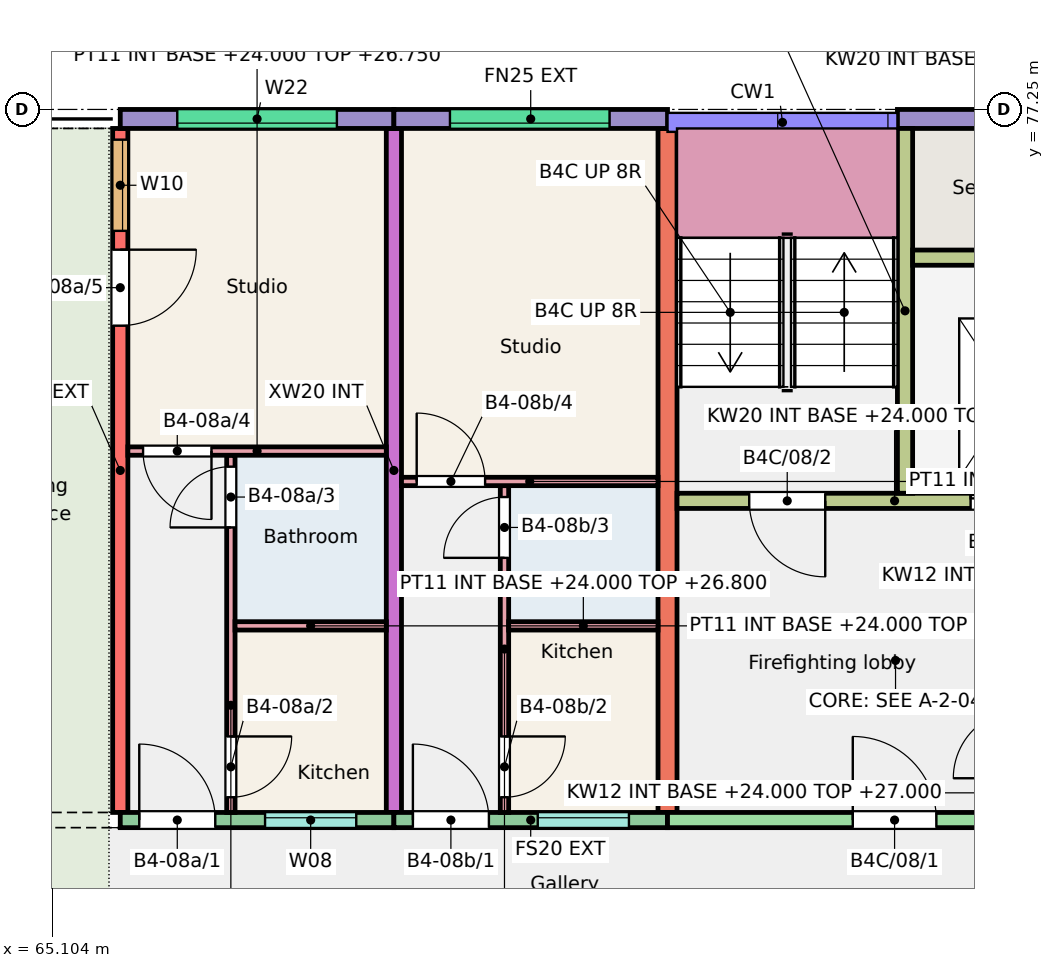
"""IFC4 building model, lengths in metres.
Left out: names, types, materials, properties, quantities, classifications, styles, units other than length and angle.
Written with IfcOpenShell. Run it as: python <this file> out.ifc"""

import sys

from ifc_helpers import new_model, si_unit, direction, frame, frame_2d, origin, place, context, subcontext, project, spatial, rectangle, extrude, element, fill, save


model = new_model("IFC4")
c1 = context("Model", 3, precision=1e-05, world=origin(), true_north=direction((0.0, 1.0)))
c2 = subcontext(c1, "Body", "Model", "MODEL_VIEW")
j1 = project(units=[si_unit("LENGTHUNIT", "METRE"), si_unit("PLANEANGLEUNIT", "RADIAN")], contexts=[c1])
p1 = place(None, origin())
s1 = spatial("IfcSite", under=j1, at=p1, CompositionType="ELEMENT")
p2 = place(p1, origin())
s2 = spatial("IfcBuilding", under=s1, at=p2, CompositionType="ELEMENT")
p3 = place(p2, frame((0.0, 0.0, 24.0)))
s3 = spatial("IfcBuildingStorey", under=s2, at=p3, CompositionType="ELEMENT", Elevation=24.0)
p4 = place(p3, frame((66.0, 68.0, 0.0), z_axis=(0.0, 0.0, 1.0), x_axis=(0.0, 1.0, 0.0)))
e1 = element("IfcWall", 1, at=p4, inside=s3, PredefinedType="SHEAR", context=c2, shape_type="SweptSolid", body=[
    extrude(rectangle(XDim=9.0, YDim=0.2, at=frame_2d((4.5, 0.0))), origin(), (0.0, 0.0, 1.0), 3.0),
])
p5 = place(p4, frame((7.653, 0.0, 0.9)))
e2 = element("IfcOpeningElement", 2, at=p5, cuts=e1, PredefinedType="OPENING", context=c2, shape_type="SweptSolid", body=[
    extrude(rectangle(XDim=1.2, YDim=1.5, at=frame_2d((0.6, 0.75))), frame((0.0, 0.11, 0.0), z_axis=(0.0, -1.0, 0.0), x_axis=(1.0, 0.0, 0.0)), (0.0, 0.0, 1.0), 0.22),
])
p6 = place(p4, frame((6.405, 0.0, 0.0)))
e3 = element("IfcOpeningElement", 3, at=p6, cuts=e1, PredefinedType="OPENING", context=c2, shape_type="SweptSolid", body=[
    extrude(rectangle(XDim=1.0, YDim=2.1, at=frame_2d((0.5, 1.05))), frame((0.0, 0.11, 0.0), z_axis=(0.0, -1.0, 0.0), x_axis=(1.0, 0.0, 0.0)), (0.0, 0.0, 1.0), 0.22),
])
p7 = place(p3, frame((69.6, 68.0, 0.0), z_axis=(0.0, 0.0, 1.0), x_axis=(0.0, 1.0, 0.0)))
e4 = element("IfcWall", 4, at=p7, inside=s3, PredefinedType="SHEAR", context=c2, shape_type="SweptSolid", body=[
    extrude(rectangle(XDim=9.0, YDim=0.2, at=frame_2d((4.5, 0.0))), origin(), (0.0, 0.0, 1.0), 3.0),
])
p8 = place(p3, frame((73.2, 68.0, 0.0), z_axis=(0.0, 0.0, 1.0), x_axis=(0.0, 1.0, 0.0)))
e5 = element("IfcWall", 5, at=p8, inside=s3, PredefinedType="SHEAR", context=c2, shape_type="SweptSolid", body=[
    extrude(rectangle(XDim=9.0, YDim=0.25, at=frame_2d((4.5, 0.0))), origin(), (0.0, 0.0, 1.0), 3.0),
])
p9 = place(p3, frame((66.0, 77.125, 0.0), z_axis=(0.0, 0.0, 1.0), x_axis=(1.0, 0.0, 0.0)))
e6 = element("IfcWall", 6, at=p9, inside=s3, PredefinedType="SOLIDWALL", context=c2, shape_type="SweptSolid", body=[
    extrude(rectangle(XDim=3.6, YDim=0.25, at=frame_2d((1.8, 0.0))), origin(), (0.0, 0.0, 1.0), 3.0),
])
p10 = place(p9, frame((0.75, 0.0, 1.2)))
e7 = element("IfcOpeningElement", 7, at=p10, cuts=e6, PredefinedType="OPENING", context=c2, shape_type="SweptSolid", body=[
    extrude(rectangle(XDim=2.1, YDim=1.2, at=frame_2d((1.05, 0.6))), frame((0.0, 0.135, 0.0), z_axis=(0.0, -1.0, 0.0), x_axis=(1.0, 0.0, 0.0)), (0.0, 0.0, 1.0), 0.27),
])
p11 = place(p3, frame((66.0, 67.9, 0.0), z_axis=(0.0, 0.0, 1.0), x_axis=(1.0, 0.0, 0.0)))
e8 = element("IfcWall", 8, at=p11, inside=s3, PredefinedType="SOLIDWALL", context=c2, shape_type="SweptSolid", body=[
    extrude(rectangle(XDim=3.6, YDim=0.2, at=frame_2d((1.8, 0.0))), origin(), (0.0, 0.0, 1.0), 3.0),
])
p12 = place(p11, frame((1.905, 0.0, 1.1)))
e9 = element("IfcOpeningElement", 9, at=p12, cuts=e8, PredefinedType="OPENING", context=c2, shape_type="SweptSolid", body=[
    extrude(rectangle(XDim=1.2, YDim=1.3, at=frame_2d((0.6, 0.65))), frame((0.0, 0.11, 0.0), z_axis=(0.0, -1.0, 0.0), x_axis=(1.0, 0.0, 0.0)), (0.0, 0.0, 1.0), 0.22),
])
p13 = place(p11, frame((0.25, 0.0, 0.0)))
e10 = element("IfcOpeningElement", 10, at=p13, cuts=e8, PredefinedType="OPENING", context=c2, shape_type="SweptSolid", body=[
    extrude(rectangle(XDim=1.0, YDim=2.1, at=frame_2d((0.5, 1.05))), frame((0.0, 0.11, 0.0), z_axis=(0.0, -1.0, 0.0), x_axis=(1.0, 0.0, 0.0)), (0.0, 0.0, 1.0), 0.22),
])
p14 = place(p3, frame((69.6, 77.125, 0.0), z_axis=(0.0, 0.0, 1.0), x_axis=(1.0, 0.0, 0.0)))
e11 = element("IfcWall", 11, at=p14, inside=s3, PredefinedType="SOLIDWALL", context=c2, shape_type="SweptSolid", body=[
    extrude(rectangle(XDim=3.6, YDim=0.25, at=frame_2d((1.8, 0.0))), origin(), (0.0, 0.0, 1.0), 3.0),
])
p15 = place(p14, frame((0.738, 0.0, 1.2)))
e12 = element("IfcOpeningElement", 12, at=p15, cuts=e11, PredefinedType="OPENING", context=c2, shape_type="SweptSolid", body=[
    extrude(rectangle(XDim=2.1, YDim=1.2, at=frame_2d((1.05, 0.6))), frame((0.0, 0.135, 0.0), z_axis=(0.0, -1.0, 0.0), x_axis=(1.0, 0.0, 0.0)), (0.0, 0.0, 1.0), 0.27),
])
p16 = place(p3, frame((69.6, 67.9, 0.0), z_axis=(0.0, 0.0, 1.0), x_axis=(1.0, 0.0, 0.0)))
e13 = element("IfcWall", 13, at=p16, inside=s3, PredefinedType="SOLIDWALL", context=c2, shape_type="SweptSolid", body=[
    extrude(rectangle(XDim=3.6, YDim=0.2, at=frame_2d((1.8, 0.0))), origin(), (0.0, 0.0, 1.0), 3.0),
])
p17 = place(p16, frame((1.893, 0.0, 1.1)))
e14 = element("IfcOpeningElement", 14, at=p17, cuts=e13, PredefinedType="OPENING", context=c2, shape_type="SweptSolid", body=[
    extrude(rectangle(XDim=1.2, YDim=1.3, at=frame_2d((0.6, 0.65))), frame((0.0, 0.11, 0.0), z_axis=(0.0, -1.0, 0.0), x_axis=(1.0, 0.0, 0.0)), (0.0, 0.0, 1.0), 0.22),
])
p18 = place(p16, frame((0.25, 0.0, 0.0)))
e15 = element("IfcOpeningElement", 15, at=p18, cuts=e13, PredefinedType="OPENING", context=c2, shape_type="SweptSolid", body=[
    extrude(rectangle(XDim=1.0, YDim=2.1, at=frame_2d((0.5, 1.05))), frame((0.0, 0.11, 0.0), z_axis=(0.0, -1.0, 0.0), x_axis=(1.0, 0.0, 0.0)), (0.0, 0.0, 1.0), 0.22),
])
p19 = place(p3, frame((76.225, 77.125, 0.0), z_axis=(0.0, 0.0, 1.0), x_axis=(1.0, 0.0, 0.0)))
e16 = element("IfcWall", 16, at=p19, inside=s3, PredefinedType="SOLIDWALL", context=c2, shape_type="SweptSolid", body=[
    extrude(rectangle(XDim=2.975, YDim=0.25, at=frame_2d((1.487, 0.0))), origin(), (0.0, 0.0, 1.0), 3.0),
])
p20 = place(p3, frame((73.2, 67.9, 0.0), z_axis=(0.0, 0.0, 1.0), x_axis=(1.0, 0.0, 0.0)))
e17 = element("IfcWall", 17, at=p20, inside=s3, PredefinedType="SHEAR", context=c2, shape_type="SweptSolid", body=[
    extrude(rectangle(XDim=5.85, YDim=0.2, at=frame_2d((2.925, 0.0))), origin(), (0.0, 0.0, 1.0), 3.0),
])
p21 = place(p20, frame((2.438, 0.0, 0.0)))
e18 = element("IfcOpeningElement", 18, at=p21, cuts=e17, PredefinedType="OPENING", context=c2, shape_type="SweptSolid", body=[
    extrude(rectangle(XDim=1.1, YDim=2.1, at=frame_2d((0.55, 1.05))), frame((0.0, 0.11, 0.0), z_axis=(0.0, -1.0, 0.0), x_axis=(1.0, 0.0, 0.0)), (0.0, 0.0, 1.0), 0.22),
])
p22 = place(p3, frame((73.325, 72.1, 0.0), z_axis=(0.0, 0.0, 1.0), x_axis=(1.0, 0.0, 0.0)))
e19 = element("IfcWall", 19, at=p22, inside=s3, PredefinedType="SHEAR", context=c2, shape_type="SweptSolid", body=[
    extrude(rectangle(XDim=5.725, YDim=0.2, at=frame_2d((2.863, 0.0))), origin(), (0.0, 0.0, 1.0), 3.0),
])
p23 = place(p22, frame((0.95, 0.0, 0.0)))
e20 = element("IfcOpeningElement", 20, at=p23, cuts=e19, PredefinedType="OPENING", context=c2, shape_type="SweptSolid", body=[
    extrude(rectangle(XDim=1.0, YDim=2.1, at=frame_2d((0.5, 1.05))), frame((0.0, 0.11, 0.0), z_axis=(0.0, -1.0, 0.0), x_axis=(1.0, 0.0, 0.0)), (0.0, 0.0, 1.0), 0.22),
])
p24 = place(p22, frame((3.863, 0.0, 0.0)))
e21 = element("IfcOpeningElement", 21, at=p24, cuts=e19, PredefinedType="OPENING", context=c2, shape_type="SweptSolid", body=[
    extrude(rectangle(XDim=1.1, YDim=2.1, at=frame_2d((0.55, 1.05))), frame((0.0, 0.11, 0.0), z_axis=(0.0, -1.0, 0.0), x_axis=(1.0, 0.0, 0.0)), (0.0, 0.0, 1.0), 0.22),
])
p25 = place(p3, frame((76.325, 72.2, 0.0), z_axis=(0.0, 0.0, 1.0), x_axis=(0.0, 1.0, 0.0)))
e22 = element("IfcWall", 22, at=p25, inside=s3, PredefinedType="SHEAR", context=c2, shape_type="SweptSolid", body=[
    extrude(rectangle(XDim=4.8, YDim=0.2, at=frame_2d((2.4, 0.0))), origin(), (0.0, 0.0, 1.0), 3.0),
])
p26 = place(p3, frame((76.425, 75.3, 0.0), z_axis=(0.0, 0.0, 1.0), x_axis=(1.0, 0.0, 0.0)))
e23 = element("IfcWall", 23, at=p26, inside=s3, PredefinedType="SHEAR", context=c2, shape_type="SweptSolid", body=[
    extrude(rectangle(XDim=2.625, YDim=0.2, at=frame_2d((1.312, 0.0))), origin(), (0.0, 0.0, 1.0), 3.0),
])
p27 = place(p3, frame((67.455, 68.0, 0.0), z_axis=(0.0, 0.0, 1.0), x_axis=(0.0, 1.0, 0.0)))
e24 = element("IfcWall", 24, at=p27, inside=s3, PredefinedType="PARTITIONING", context=c2, shape_type="SweptSolid", body=[
    extrude(rectangle(XDim=4.7, YDim=0.11, at=frame_2d((2.35, 0.0))), origin(), (0.0, 0.0, 1.0), 2.75),
])
p28 = place(p27, frame((0.2, 0.0, 0.0)))
e25 = element("IfcOpeningElement", 25, at=p28, cuts=e24, PredefinedType="OPENING", context=c2, shape_type="SweptSolid", body=[
    extrude(rectangle(XDim=0.8, YDim=2.1, at=frame_2d((0.4, 1.05))), frame((0.0, 0.065, 0.0), z_axis=(0.0, -1.0, 0.0), x_axis=(1.0, 0.0, 0.0)), (0.0, 0.0, 1.0), 0.13),
])
p29 = place(p27, frame((3.75, 0.0, 0.0)))
e26 = element("IfcOpeningElement", 26, at=p29, cuts=e24, PredefinedType="OPENING", context=c2, shape_type="SweptSolid", body=[
    extrude(rectangle(XDim=0.8, YDim=2.1, at=frame_2d((0.4, 1.05))), frame((0.0, 0.065, 0.0), z_axis=(0.0, -1.0, 0.0), x_axis=(1.0, 0.0, 0.0)), (0.0, 0.0, 1.0), 0.13),
])
p30 = place(p3, frame((67.51, 70.455, 0.0), z_axis=(0.0, 0.0, 1.0), x_axis=(1.0, 0.0, 0.0)))
e27 = element("IfcWall", 27, at=p30, inside=s3, PredefinedType="PARTITIONING", context=c2, shape_type="SweptSolid", body=[
    extrude(rectangle(XDim=1.99, YDim=0.11, at=frame_2d((0.995, 0.0))), origin(), (0.0, 0.0, 1.0), 2.75),
])
p31 = place(p3, frame((66.1, 72.755, 0.0), z_axis=(0.0, 0.0, 1.0), x_axis=(1.0, 0.0, 0.0)))
e28 = element("IfcWall", 28, at=p31, inside=s3, PredefinedType="PARTITIONING", context=c2, shape_type="SweptSolid", body=[
    extrude(rectangle(XDim=3.4, YDim=0.11, at=frame_2d((1.7, 0.0))), origin(), (0.0, 0.0, 1.0), 2.75),
])
p32 = place(p31, frame((0.2, 0.0, 0.0)))
e29 = element("IfcOpeningElement", 29, at=p32, cuts=e28, PredefinedType="OPENING", context=c2, shape_type="SweptSolid", body=[
    extrude(rectangle(XDim=0.9, YDim=2.1, at=frame_2d((0.45, 1.05))), frame((0.0, 0.065, 0.0), z_axis=(0.0, -1.0, 0.0), x_axis=(1.0, 0.0, 0.0)), (0.0, 0.0, 1.0), 0.13),
])
p33 = place(p3, frame((71.055, 68.0, 0.0), z_axis=(0.0, 0.0, 1.0), x_axis=(0.0, 1.0, 0.0)))
e30 = element("IfcWall", 30, at=p33, inside=s3, PredefinedType="PARTITIONING", context=c2, shape_type="SweptSolid", body=[
    extrude(rectangle(XDim=4.3, YDim=0.11, at=frame_2d((2.15, 0.0))), origin(), (0.0, 0.0, 1.0), 2.8),
])
p34 = place(p33, frame((0.2, 0.0, 0.0)))
e31 = element("IfcOpeningElement", 31, at=p34, cuts=e30, PredefinedType="OPENING", context=c2, shape_type="SweptSolid", body=[
    extrude(rectangle(XDim=0.8, YDim=2.1, at=frame_2d((0.4, 1.05))), frame((0.0, 0.065, 0.0), z_axis=(0.0, -1.0, 0.0), x_axis=(1.0, 0.0, 0.0)), (0.0, 0.0, 1.0), 0.13),
])
p35 = place(p33, frame((3.35, 0.0, 0.0)))
e32 = element("IfcOpeningElement", 32, at=p35, cuts=e30, PredefinedType="OPENING", context=c2, shape_type="SweptSolid", body=[
    extrude(rectangle(XDim=0.8, YDim=2.1, at=frame_2d((0.4, 1.05))), frame((0.0, 0.065, 0.0), z_axis=(0.0, -1.0, 0.0), x_axis=(1.0, 0.0, 0.0)), (0.0, 0.0, 1.0), 0.13),
])
p36 = place(p3, frame((71.11, 70.455, 0.0), z_axis=(0.0, 0.0, 1.0), x_axis=(1.0, 0.0, 0.0)))
e33 = element("IfcWall", 33, at=p36, inside=s3, PredefinedType="PARTITIONING", context=c2, shape_type="SweptSolid", body=[
    extrude(rectangle(XDim=1.965, YDim=0.11, at=frame_2d((0.982, 0.0))), origin(), (0.0, 0.0, 1.0), 2.8),
])
p37 = place(p3, frame((69.7, 72.355, 0.0), z_axis=(0.0, 0.0, 1.0), x_axis=(1.0, 0.0, 0.0)))
e34 = element("IfcWall", 34, at=p37, inside=s3, PredefinedType="PARTITIONING", context=c2, shape_type="SweptSolid", body=[
    extrude(rectangle(XDim=3.375, YDim=0.11, at=frame_2d((1.688, 0.0))), origin(), (0.0, 0.0, 1.0), 2.8),
])
p38 = place(p37, frame((0.2, 0.0, 0.0)))
e35 = element("IfcOpeningElement", 35, at=p38, cuts=e34, PredefinedType="OPENING", context=c2, shape_type="SweptSolid", body=[
    extrude(rectangle(XDim=0.9, YDim=2.1, at=frame_2d((0.45, 1.05))), frame((0.0, 0.065, 0.0), z_axis=(0.0, -1.0, 0.0), x_axis=(1.0, 0.0, 0.0)), (0.0, 0.0, 1.0), 0.13),
])
p39 = place(p12, origin())
e36 = element("IfcWindow", 36, at=p39, inside=s3, PartitioningType="SINGLE_PANEL", PredefinedType="WINDOW", context=c2, shape_type="SweptSolid", body=[
    extrude(rectangle(XDim=1.2, YDim=1.3, at=frame_2d((0.6, 0.65))), frame((0.0, 0.06, 0.0), z_axis=(0.0, -1.0, 0.0), x_axis=(1.0, 0.0, 0.0)), (0.0, 0.0, 1.0), 0.06),
])
fill(e9, e36)
p40 = place(p10, origin())
e37 = element("IfcWindow", 37, at=p40, inside=s3, PartitioningType="SINGLE_PANEL", PredefinedType="WINDOW", context=c2, shape_type="SweptSolid", body=[
    extrude(rectangle(XDim=2.1, YDim=1.2, at=frame_2d((1.05, 0.6))), frame((0.0, -0.025, 0.0), z_axis=(0.0, -1.0, 0.0), x_axis=(1.0, 0.0, 0.0)), (0.0, 0.0, 1.0), 0.06),
])
fill(e7, e37)
p41 = place(p5, origin())
e38 = element("IfcWindow", 38, at=p41, inside=s3, PartitioningType="SINGLE_PANEL", PredefinedType="WINDOW", context=c2, shape_type="SweptSolid", body=[
    extrude(rectangle(XDim=1.2, YDim=1.5, at=frame_2d((0.6, 0.75))), frame((0.0, 0.0, 0.0), z_axis=(0.0, -1.0, 0.0), x_axis=(1.0, 0.0, 0.0)), (0.0, 0.0, 1.0), 0.06),
])
fill(e2, e38)
p42 = place(p17, origin())
e39 = element("IfcWindow", 39, at=p42, inside=s3, PartitioningType="SINGLE_PANEL", PredefinedType="WINDOW", context=c2, shape_type="SweptSolid", body=[
    extrude(rectangle(XDim=1.2, YDim=1.3, at=frame_2d((0.6, 0.65))), frame((0.0, 0.06, 0.0), z_axis=(0.0, -1.0, 0.0), x_axis=(1.0, 0.0, 0.0)), (0.0, 0.0, 1.0), 0.06),
])
fill(e14, e39)
p43 = place(p15, origin())
e40 = element("IfcWindow", 40, at=p43, inside=s3, PartitioningType="SINGLE_PANEL", PredefinedType="WINDOW", context=c2, shape_type="SweptSolid", body=[
    extrude(rectangle(XDim=2.1, YDim=1.2, at=frame_2d((1.05, 0.6))), frame((0.0, -0.025, 0.0), z_axis=(0.0, -1.0, 0.0), x_axis=(1.0, 0.0, 0.0)), (0.0, 0.0, 1.0), 0.06),
])
fill(e12, e40)
p44 = place(p13, origin())
e41 = element("IfcDoor", 41, at=p44, inside=s3, OperationType="SINGLE_SWING_LEFT", PredefinedType="DOOR", context=c2, shape_type="SweptSolid", body=[
    extrude(rectangle(XDim=1.0, YDim=2.1, at=frame_2d((0.5, 1.05))), frame((0.0, 0.025, 0.0), z_axis=(0.0, -1.0, 0.0), x_axis=(1.0, 0.0, 0.0)), (0.0, 0.0, 1.0), 0.05),
])
fill(e10, e41)
p45 = place(p28, origin())
e42 = element("IfcDoor", 42, at=p45, inside=s3, OperationType="SINGLE_SWING_RIGHT", PredefinedType="DOOR", context=c2, shape_type="SweptSolid", body=[
    extrude(rectangle(XDim=0.8, YDim=2.1, at=frame_2d((0.4, 1.05))), frame((0.0, 0.025, 0.0), z_axis=(0.0, -1.0, 0.0), x_axis=(1.0, 0.0, 0.0)), (0.0, 0.0, 1.0), 0.05),
])
fill(e25, e42)
p46 = place(p29, origin())
e43 = element("IfcDoor", 43, at=p46, inside=s3, OperationType="SINGLE_SWING_LEFT", PredefinedType="DOOR", context=c2, shape_type="SweptSolid", body=[
    extrude(rectangle(XDim=0.8, YDim=2.1, at=frame_2d((0.4, 1.05))), frame((0.0, 0.025, 0.0), z_axis=(0.0, -1.0, 0.0), x_axis=(1.0, 0.0, 0.0)), (0.0, 0.0, 1.0), 0.05),
])
fill(e26, e43)
p47 = place(p32, origin())
e44 = element("IfcDoor", 44, at=p47, inside=s3, OperationType="SINGLE_SWING_RIGHT", PredefinedType="DOOR", context=c2, shape_type="SweptSolid", body=[
    extrude(rectangle(XDim=0.9, YDim=2.1, at=frame_2d((0.45, 1.05))), frame((0.0, 0.025, 0.0), z_axis=(0.0, -1.0, 0.0), x_axis=(1.0, 0.0, 0.0)), (0.0, 0.0, 1.0), 0.05),
])
fill(e29, e44)
p48 = place(p6, origin())
e45 = element("IfcDoor", 45, at=p48, inside=s3, OperationType="SINGLE_SWING_RIGHT", PredefinedType="DOOR", context=c2, shape_type="SweptSolid", body=[
    extrude(rectangle(XDim=1.0, YDim=2.1, at=frame_2d((0.5, 1.05))), frame((0.0, 0.025, 0.0), z_axis=(0.0, -1.0, 0.0), x_axis=(1.0, 0.0, 0.0)), (0.0, 0.0, 1.0), 0.05),
])
fill(e3, e45)
p49 = place(p18, origin())
e46 = element("IfcDoor", 46, at=p49, inside=s3, OperationType="SINGLE_SWING_LEFT", PredefinedType="DOOR", context=c2, shape_type="SweptSolid", body=[
    extrude(rectangle(XDim=1.0, YDim=2.1, at=frame_2d((0.5, 1.05))), frame((0.0, 0.025, 0.0), z_axis=(0.0, -1.0, 0.0), x_axis=(1.0, 0.0, 0.0)), (0.0, 0.0, 1.0), 0.05),
])
fill(e15, e46)
p50 = place(p34, origin())
e47 = element("IfcDoor", 47, at=p50, inside=s3, OperationType="SINGLE_SWING_RIGHT", PredefinedType="DOOR", context=c2, shape_type="SweptSolid", body=[
    extrude(rectangle(XDim=0.8, YDim=2.1, at=frame_2d((0.4, 1.05))), frame((0.0, 0.025, 0.0), z_axis=(0.0, -1.0, 0.0), x_axis=(1.0, 0.0, 0.0)), (0.0, 0.0, 1.0), 0.05),
])
fill(e31, e47)
p51 = place(p35, origin())
e48 = element("IfcDoor", 48, at=p51, inside=s3, OperationType="SINGLE_SWING_LEFT", PredefinedType="DOOR", context=c2, shape_type="SweptSolid", body=[
    extrude(rectangle(XDim=0.8, YDim=2.1, at=frame_2d((0.4, 1.05))), frame((0.0, 0.025, 0.0), z_axis=(0.0, -1.0, 0.0), x_axis=(1.0, 0.0, 0.0)), (0.0, 0.0, 1.0), 0.05),
])
fill(e32, e48)
p52 = place(p38, origin())
e49 = element("IfcDoor", 49, at=p52, inside=s3, OperationType="SINGLE_SWING_LEFT", PredefinedType="DOOR", context=c2, shape_type="SweptSolid", body=[
    extrude(rectangle(XDim=0.9, YDim=2.1, at=frame_2d((0.45, 1.05))), frame((0.0, 0.025, 0.0), z_axis=(0.0, -1.0, 0.0), x_axis=(1.0, 0.0, 0.0)), (0.0, 0.0, 1.0), 0.05),
])
fill(e35, e49)
p53 = place(p21, origin())
e50 = element("IfcDoor", 50, at=p53, inside=s3, OperationType="SINGLE_SWING_LEFT", PredefinedType="DOOR", context=c2, shape_type="SweptSolid", body=[
    extrude(rectangle(XDim=1.1, YDim=2.1, at=frame_2d((0.55, 1.05))), frame((0.0, 0.025, 0.0), z_axis=(0.0, -1.0, 0.0), x_axis=(1.0, 0.0, 0.0)), (0.0, 0.0, 1.0), 0.05),
])
fill(e18, e50)
p54 = place(p23, origin())
e51 = element("IfcDoor", 51, at=p54, inside=s3, OperationType="SINGLE_SWING_RIGHT", PredefinedType="DOOR", context=c2, shape_type="SweptSolid", body=[
    extrude(rectangle(XDim=1.0, YDim=2.1, at=frame_2d((0.5, 1.05))), frame((0.0, 0.025, 0.0), z_axis=(0.0, -1.0, 0.0), x_axis=(1.0, 0.0, 0.0)), (0.0, 0.0, 1.0), 0.05),
])
fill(e20, e51)
p55 = place(p24, origin())
e52 = element("IfcDoor", 52, at=p55, inside=s3, OperationType="DOUBLE_DOOR_SLIDING", PredefinedType="DOOR", context=c2, shape_type="SweptSolid", body=[
    extrude(rectangle(XDim=1.1, YDim=2.1, at=frame_2d((0.55, 1.05))), frame((0.0, 0.025, 0.0), z_axis=(0.0, -1.0, 0.0), x_axis=(1.0, 0.0, 0.0)), (0.0, 0.0, 1.0), 0.05),
])
fill(e21, e52)
save(model, sys.argv[1])
